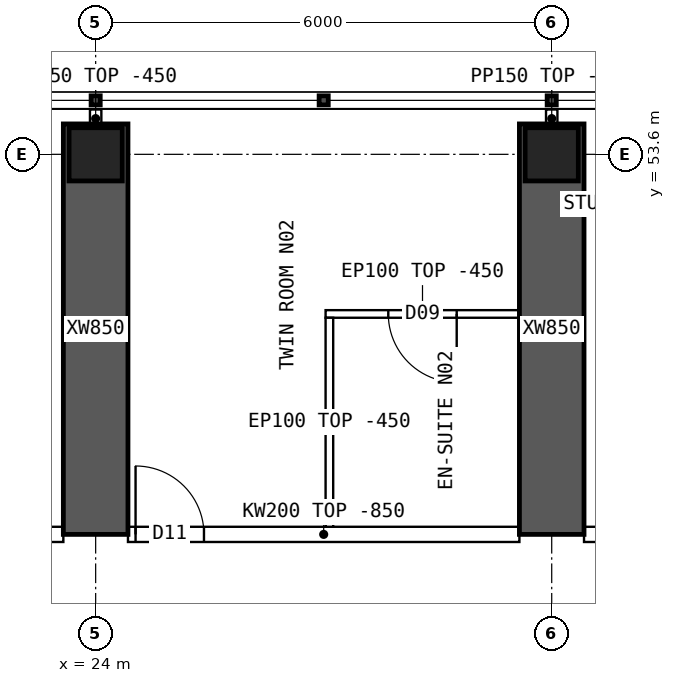
"""IFC4 building model, lengths in metres.
Left out: names, types, materials, properties, quantities, classifications, styles, units other than length and angle.
Written with IfcOpenShell. Run it as: python <this file> out.ifc"""

import sys

from ifc_helpers import new_model, si_unit, direction, frame, frame_2d, origin, origin_2d, place, context, subcontext, project, spatial, polyline, rectangle, hollow_rectangle, outline, extrude, element, fill, save


model = new_model("IFC4")
c1 = context("Model", 3, precision=1e-05, world=origin(), true_north=direction((0.0, 1.0)))
c2 = subcontext(c1, "Body", "Model", "MODEL_VIEW")
j1 = project(units=[si_unit("LENGTHUNIT", "METRE"), si_unit("PLANEANGLEUNIT", "RADIAN")], contexts=[c1])
p1 = place(None, origin())
s1 = spatial("IfcSite", under=j1, at=p1, CompositionType="ELEMENT")
p2 = place(p1, origin())
s2 = spatial("IfcBuilding", under=s1, at=p2, CompositionType="ELEMENT")
p3 = place(p2, frame((0.0, 0.0, 174.85)))
s3 = spatial("IfcBuildingStorey", under=s2, at=p3, CompositionType="ELEMENT", Elevation=174.85)
for number, where, z_axis, x_axis in (
    (1, (24.0, 53.6, 0.0), (0.0, 0.0, 1.0), (1.0, 0.0, 0.0)),
    (2, (30.0, 53.6, 0.0), (0.0, 0.0, 1.0), (1.0, 0.0, 0.0)),
):
    element("IfcColumn", number, at=place(p3, frame(where, z_axis=z_axis, x_axis=x_axis)), inside=s3, PredefinedType="COLUMN", context=c2, shape_type="SweptSolid", body=[
        extrude(hollow_rectangle(XDim=0.7, YDim=0.7, WallThickness=0.07, at=origin_2d()), origin(), (0.0, 0.0, 1.0), 3.75),
    ])
for number, where, z_axis, x_axis in (
    (3, (24.0, 48.6, 0.0), (0.0, 0.0, 1.0), (0.0, 1.0, 0.0)),
    (4, (30.0, 48.6, 0.0), (0.0, 0.0, 1.0), (0.0, 1.0, 0.0)),
):
    element("IfcWall", number, at=place(p3, frame(where, z_axis=z_axis, x_axis=x_axis)), inside=s3, PredefinedType="SHEAR", context=c2, shape_type="SweptSolid", body=[
        extrude(rectangle(XDim=5.4, YDim=0.85, at=frame_2d((2.7, 0.0))), origin(), (0.0, 0.0, 1.0), 3.75),
    ])
p4 = place(p3, frame((18.425, 48.6, 0.0), z_axis=(0.0, 0.0, 1.0), x_axis=(1.0, 0.0, 0.0)))
e5 = element("IfcWall", 5, at=p4, inside=s3, PredefinedType="SOLIDWALL", context=c2, shape_type="SweptSolid", body=[
    extrude(outline(polyline([(0.0, 0.0), (5.15, 0.0), (5.15, 2.9), (0.0, 2.9), (0.0, 0.0)])), frame((0.0, 0.1, 0.0), z_axis=(0.0, -1.0, 0.0), x_axis=(1.0, 0.0, 0.0)), (0.0, 0.0, 1.0), 0.2),
])
p5 = place(p4, frame((0.6, 0.0, 0.0)))
e6 = element("IfcOpeningElement", 6, at=p5, cuts=e5, PredefinedType="OPENING", context=c2, shape_type="SweptSolid", body=[
    extrude(rectangle(XDim=1.0, YDim=2.1, at=frame_2d((0.5, 1.05))), frame((0.0, 0.11, 0.0), z_axis=(0.0, -1.0, 0.0), x_axis=(1.0, 0.0, 0.0)), (0.0, 0.0, 1.0), 0.22),
])
p6 = place(p3, frame((24.425, 48.6, 0.0), z_axis=(0.0, 0.0, 1.0), x_axis=(1.0, 0.0, 0.0)))
e7 = element("IfcWall", 7, at=p6, inside=s3, PredefinedType="SOLIDWALL", context=c2, shape_type="SweptSolid", body=[
    extrude(outline(polyline([(0.0, 0.0), (5.15, 0.0), (5.15, 2.9), (0.0, 2.9), (0.0, 0.0)])), frame((0.0, 0.1, 0.0), z_axis=(0.0, -1.0, 0.0), x_axis=(1.0, 0.0, 0.0)), (0.0, 0.0, 1.0), 0.2),
])
p7 = place(p6, frame((0.1, 0.0, 0.0)))
e8 = element("IfcOpeningElement", 8, at=p7, cuts=e7, PredefinedType="OPENING", context=c2, shape_type="SweptSolid", body=[
    extrude(rectangle(XDim=0.9, YDim=2.1, at=frame_2d((0.45, 1.05))), frame((0.0, 0.11, 0.0), z_axis=(0.0, -1.0, 0.0), x_axis=(1.0, 0.0, 0.0)), (0.0, 0.0, 1.0), 0.22),
])
p8 = place(p3, frame((30.425, 48.6, 0.0), z_axis=(0.0, 0.0, 1.0), x_axis=(1.0, 0.0, 0.0)))
e9 = element("IfcWall", 9, at=p8, inside=s3, PredefinedType="SOLIDWALL", context=c2, shape_type="SweptSolid", body=[
    extrude(outline(polyline([(0.0, 0.0), (5.15, 0.0), (5.15, 2.9), (0.0, 2.9), (0.0, 0.0)])), frame((0.0, 0.1, 0.0), z_axis=(0.0, -1.0, 0.0), x_axis=(1.0, 0.0, 0.0)), (0.0, 0.0, 1.0), 0.2),
])
p9 = place(p8, frame((2.3, 0.0, 0.0)))
e10 = element("IfcOpeningElement", 10, at=p9, cuts=e9, PredefinedType="OPENING", context=c2, shape_type="SweptSolid", body=[
    extrude(rectangle(XDim=0.9, YDim=2.1, at=frame_2d((0.45, 1.05))), frame((0.0, 0.11, 0.0), z_axis=(0.0, -1.0, 0.0), x_axis=(1.0, 0.0, 0.0)), (0.0, 0.0, 1.0), 0.22),
])
p10 = place(p3, frame((27.025, 51.5, 0.0), z_axis=(0.0, 0.0, 1.0), x_axis=(1.0, 0.0, 0.0)))
e11 = element("IfcWall", 11, at=p10, inside=s3, PredefinedType="PARTITIONING", context=c2, shape_type="SweptSolid", body=[
    extrude(rectangle(XDim=2.55, YDim=0.1, at=frame_2d((1.275, 0.0))), origin(), (0.0, 0.0, 1.0), 3.3),
])
p11 = place(p10, frame((0.825, 0.0, 0.0)))
e12 = element("IfcOpeningElement", 12, at=p11, cuts=e11, PredefinedType="OPENING", context=c2, shape_type="SweptSolid", body=[
    extrude(rectangle(XDim=0.9, YDim=2.1, at=frame_2d((0.45, 1.05))), frame((0.0, 0.06, 0.0), z_axis=(0.0, -1.0, 0.0), x_axis=(1.0, 0.0, 0.0)), (0.0, 0.0, 1.0), 0.12),
])
p12 = place(p3, frame((27.075, 51.45, 0.0), z_axis=(0.0, 0.0, 1.0), x_axis=(0.0, -1.0, 0.0)))
e13 = element("IfcWall", 13, at=p12, inside=s3, PredefinedType="PARTITIONING", context=c2, shape_type="SweptSolid", body=[
    extrude(outline(polyline([(0.0, 0.0), (2.75, 0.0), (2.75, 2.9), (2.702, 2.9), (2.7, 3.3), (0.0, 3.3), (0.0, 0.0)])), frame((0.0, 0.05, 0.0), z_axis=(0.0, -1.0, 0.0), x_axis=(1.0, 0.0, 0.0)), (0.0, 0.0, 1.0), 0.1),
])
for number, where, z_axis, x_axis in (
    (14, (24.0, 53.95, 0.0), (0.0, 0.0, 1.0), (0.0, 1.0, 0.0)),
    (15, (30.0, 53.95, 0.0), (0.0, 0.0, 1.0), (0.0, 1.0, 0.0)),
):
    element("IfcWall", number, at=place(p3, frame(where, z_axis=z_axis, x_axis=x_axis)), inside=s3, PredefinedType="PARTITIONING", context=c2, shape_type="SweptSolid", body=[
        extrude(rectangle(XDim=0.24, YDim=0.15, at=frame_2d((0.12, 0.0))), origin(), (0.0, 0.0, 1.0), 3.3),
    ])
p13 = place(p11, origin())
e16 = element("IfcDoor", 16, at=p13, inside=s3, OperationType="SINGLE_SWING_RIGHT", PredefinedType="DOOR", context=c2, shape_type="SweptSolid", body=[
    extrude(rectangle(XDim=0.9, YDim=2.1, at=frame_2d((0.45, 1.05))), frame((0.0, 0.025, 0.0), z_axis=(0.0, -1.0, 0.0), x_axis=(1.0, 0.0, 0.0)), (0.0, 0.0, 1.0), 0.05),
])
fill(e12, e16)
p14 = place(p7, origin())
e17 = element("IfcDoor", 17, at=p14, inside=s3, OperationType="SINGLE_SWING_LEFT", PredefinedType="DOOR", context=c2, shape_type="SweptSolid", body=[
    extrude(rectangle(XDim=0.9, YDim=2.1, at=frame_2d((0.45, 1.05))), frame((0.0, 0.025, 0.0), z_axis=(0.0, -1.0, 0.0), x_axis=(1.0, 0.0, 0.0)), (0.0, 0.0, 1.0), 0.05),
])
fill(e8, e17)
save(model, sys.argv[1])
